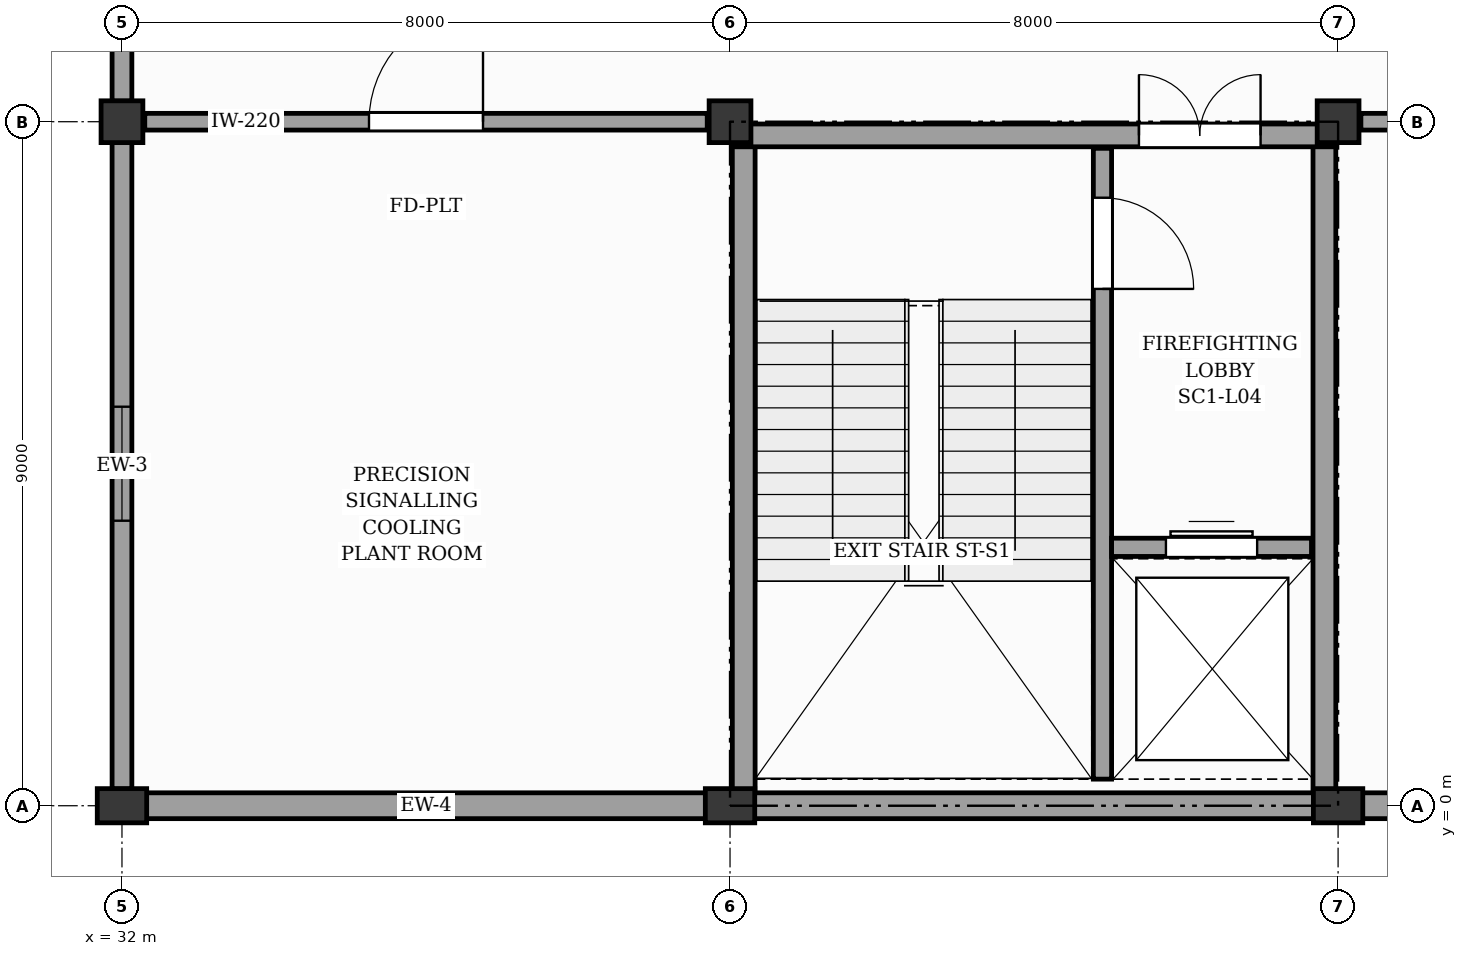
"""IFC4 building model, lengths in metres.
Left out: names, types, materials, properties, quantities, classifications, styles, units other than length and angle.
Written with IfcOpenShell. Run it as: python <this file> out.ifc"""

import sys

from ifc_helpers import new_model, si_unit, direction, frame, frame_2d, origin, origin_2d, place, context, subcontext, project, spatial, rectangle, extrude, element, fill, save


model = new_model("IFC4")
c1 = context("Model", 3, precision=1e-05, world=origin(), true_north=direction((0.0, 1.0)))
c2 = subcontext(c1, "Body", "Model", "MODEL_VIEW")
j1 = project(units=[si_unit("LENGTHUNIT", "METRE"), si_unit("PLANEANGLEUNIT", "RADIAN")], contexts=[c1])
p1 = place(None, origin())
s1 = spatial("IfcSite", under=j1, at=p1, CompositionType="ELEMENT")
p2 = place(p1, origin())
s2 = spatial("IfcBuilding", under=s1, at=p2, CompositionType="ELEMENT")
p3 = place(p2, frame((0.0, 0.0, 20.4)))
s3 = spatial("IfcBuildingStorey", under=s2, at=p3, CompositionType="ELEMENT", Elevation=20.4)
p4 = place(p3, frame((32.0, 0.0, 0.0), z_axis=(0.0, 0.0, 1.0), x_axis=(1.0, 0.0, 0.0)))
e1 = element("IfcColumn", 1, at=p4, inside=s3, PredefinedType="PILASTER", context=c2, shape_type="SweptSolid", body=[
    extrude(rectangle(XDim=0.65, YDim=0.45, at=origin_2d()), origin(), (0.0, 0.0, 1.0), 4.2),
])
p5 = place(p3, frame((32.0, 9.0, 0.0), z_axis=(0.0, 0.0, 1.0), x_axis=(1.0, 0.0, 0.0)))
e2 = element("IfcColumn", 2, at=p5, inside=s3, PredefinedType="COLUMN", context=c2, shape_type="SweptSolid", body=[
    extrude(rectangle(XDim=0.55, YDim=0.55, at=origin_2d()), origin(), (0.0, 0.0, 1.0), 4.2),
])
p6 = place(p3, frame((40.0, 0.0, 0.0), z_axis=(0.0, 0.0, 1.0), x_axis=(1.0, 0.0, 0.0)))
e3 = element("IfcColumn", 3, at=p6, inside=s3, PredefinedType="PILASTER", context=c2, shape_type="SweptSolid", body=[
    extrude(rectangle(XDim=0.65, YDim=0.45, at=origin_2d()), origin(), (0.0, 0.0, 1.0), 4.2),
])
p7 = place(p3, frame((40.0, 9.0, 0.0), z_axis=(0.0, 0.0, 1.0), x_axis=(1.0, 0.0, 0.0)))
e4 = element("IfcColumn", 4, at=p7, inside=s3, PredefinedType="COLUMN", context=c2, shape_type="SweptSolid", body=[
    extrude(rectangle(XDim=0.55, YDim=0.55, at=origin_2d()), origin(), (0.0, 0.0, 1.0), 4.2),
])
p8 = place(p3, frame((48.0, 0.0, 0.0), z_axis=(0.0, 0.0, 1.0), x_axis=(1.0, 0.0, 0.0)))
e5 = element("IfcColumn", 5, at=p8, inside=s3, PredefinedType="PILASTER", context=c2, shape_type="SweptSolid", body=[
    extrude(rectangle(XDim=0.65, YDim=0.45, at=origin_2d()), origin(), (0.0, 0.0, 1.0), 4.2),
])
p9 = place(p3, frame((48.0, 9.0, 0.0), z_axis=(0.0, 0.0, 1.0), x_axis=(1.0, 0.0, 0.0)))
e6 = element("IfcColumn", 6, at=p9, inside=s3, PredefinedType="COLUMN", context=c2, shape_type="SweptSolid", body=[
    extrude(rectangle(XDim=0.55, YDim=0.55, at=origin_2d()), origin(), (0.0, 0.0, 1.0), 4.2),
])
p10 = place(p3, frame((32.32, 0.0, 0.0), z_axis=(0.0, 0.0, 1.0), x_axis=(1.0, 0.0, 0.0)))
e7 = element("IfcWall", 7, at=p10, inside=s3, PredefinedType="SOLIDWALL", context=c2, shape_type="SweptSolid", body=[
    extrude(rectangle(XDim=7.36, YDim=0.34, at=frame_2d((3.68, 0.0))), origin(), (0.0, 0.0, 1.0), 3.24),
])
for number, where, z_axis, x_axis in (
    (8, (40.32, 0.0, 0.0), (0.0, 0.0, 1.0), (1.0, 0.0, 0.0)),
    (9, (48.32, 0.0, 0.0), (0.0, 0.0, 1.0), (1.0, 0.0, 0.0)),
):
    element("IfcWall", number, at=place(p3, frame(where, z_axis=z_axis, x_axis=x_axis)), inside=s3, PredefinedType="SOLIDWALL", context=c2, shape_type="SweptSolid", body=[
        extrude(rectangle(XDim=7.36, YDim=0.34, at=frame_2d((3.68, 0.0))), origin(), (0.0, 0.0, 1.0), 3.18),
    ])
p11 = place(p3, frame((32.0, 0.22, 0.0), z_axis=(0.0, 0.0, 1.0), x_axis=(0.0, 1.0, 0.0)))
e10 = element("IfcWall", 10, at=p11, inside=s3, PredefinedType="SOLIDWALL", context=c2, shape_type="SweptSolid", body=[
    extrude(rectangle(XDim=8.51, YDim=0.26, at=frame_2d((4.255, 0.0))), origin(), (0.0, 0.0, 1.0), 3.18),
])
p12 = place(p11, frame((3.53, 0.0, 0.95)))
e11 = element("IfcOpeningElement", 11, at=p12, cuts=e10, PredefinedType="OPENING", context=c2, shape_type="SweptSolid", body=[
    extrude(rectangle(XDim=1.5, YDim=1.9, at=frame_2d((0.75, 0.95))), frame((0.0, 0.14, 0.0), z_axis=(0.0, -1.0, 0.0), x_axis=(1.0, 0.0, 0.0)), (0.0, 0.0, 1.0), 0.28),
])
p13 = place(p3, frame((32.0, 9.27, 0.0), z_axis=(0.0, 0.0, 1.0), x_axis=(0.0, 1.0, 0.0)))
e12 = element("IfcWall", 12, at=p13, inside=s3, PredefinedType="SOLIDWALL", context=c2, shape_type="SweptSolid", body=[
    extrude(rectangle(XDim=8.46, YDim=0.26, at=frame_2d((4.23, 0.0))), origin(), (0.0, 0.0, 1.0), 3.18),
])
p14 = place(p13, frame((3.48, 0.0, 0.95)))
e13 = element("IfcOpeningElement", 13, at=p14, cuts=e12, PredefinedType="OPENING", context=c2, shape_type="SweptSolid", body=[
    extrude(rectangle(XDim=1.5, YDim=1.9, at=frame_2d((0.75, 0.95))), frame((0.0, 0.14, 0.0), z_axis=(0.0, -1.0, 0.0), x_axis=(1.0, 0.0, 0.0)), (0.0, 0.0, 1.0), 0.28),
])
p15 = place(p3, frame((44.9, 0.35, 0.0), z_axis=(0.0, 0.0, 1.0), x_axis=(0.0, 1.0, 0.0)))
e14 = element("IfcWall", 14, at=p15, inside=s3, PredefinedType="SHEAR", context=c2, shape_type="SweptSolid", body=[
    extrude(rectangle(XDim=8.3, YDim=0.24, at=frame_2d((4.15, 0.0))), origin(), (0.0, 0.0, 1.0), 3.92),
])
p16 = place(p15, frame((6.45, 0.0, 0.0)))
e15 = element("IfcOpeningElement", 15, at=p16, cuts=e14, PredefinedType="OPENING", context=c2, shape_type="SweptSolid", body=[
    extrude(rectangle(XDim=1.2, YDim=2.15, at=frame_2d((0.6, 1.075))), frame((0.0, 0.13, 0.0), z_axis=(0.0, -1.0, 0.0), x_axis=(1.0, 0.0, 0.0)), (0.0, 0.0, 1.0), 0.26),
])
p17 = place(p3, frame((45.02, 3.4, 0.0), z_axis=(0.0, 0.0, 1.0), x_axis=(1.0, 0.0, 0.0)))
e16 = element("IfcWall", 16, at=p17, inside=s3, PredefinedType="SHEAR", context=c2, shape_type="SweptSolid", body=[
    extrude(rectangle(XDim=2.63, YDim=0.24, at=frame_2d((1.315, 0.0))), origin(), (0.0, 0.0, 1.0), 3.92),
])
p18 = place(p17, frame((0.715, 0.0, 0.0)))
e17 = element("IfcOpeningElement", 17, at=p18, cuts=e16, PredefinedType="OPENING", context=c2, shape_type="SweptSolid", body=[
    extrude(rectangle(XDim=1.2, YDim=2.15, at=frame_2d((0.6, 1.075))), frame((0.0, 0.13, 0.0), z_axis=(0.0, -1.0, 0.0), x_axis=(1.0, 0.0, 0.0)), (0.0, 0.0, 1.0), 0.26),
])
for number, where, z_axis, x_axis in (
    (18, (40.18, 0.18, 0.0), (0.0, 0.0, 1.0), (0.0, 1.0, 0.0)),
    (19, (47.82, 0.18, 0.0), (0.0, 0.0, 1.0), (0.0, 1.0, 0.0)),
):
    element("IfcWall", number, at=place(p3, frame(where, z_axis=z_axis, x_axis=x_axis)), inside=s3, PredefinedType="SHEAR", context=c2, shape_type="SweptSolid", body=[
        extrude(rectangle(XDim=8.64, YDim=0.3, at=frame_2d((4.32, 0.0))), origin(), (0.0, 0.0, 1.0), 3.92),
    ])
p19 = place(p3, frame((40.03, 8.82, 0.0), z_axis=(0.0, 0.0, 1.0), x_axis=(1.0, 0.0, 0.0)))
e20 = element("IfcWall", 20, at=p19, inside=s3, PredefinedType="SHEAR", context=c2, shape_type="SweptSolid", body=[
    extrude(rectangle(XDim=7.94, YDim=0.3, at=frame_2d((3.97, 0.0))), origin(), (0.0, 0.0, 1.0), 3.92),
])
p20 = place(p19, frame((5.35, 0.0, 0.0)))
e21 = element("IfcOpeningElement", 21, at=p20, cuts=e20, PredefinedType="OPENING", context=c2, shape_type="SweptSolid", body=[
    extrude(rectangle(XDim=1.6, YDim=2.15, at=frame_2d((0.8, 1.075))), frame((0.0, 0.16, 0.0), z_axis=(0.0, -1.0, 0.0), x_axis=(1.0, 0.0, 0.0)), (0.0, 0.0, 1.0), 0.32),
])
p21 = place(p3, frame((32.3, 9.0, 0.0), z_axis=(0.0, 0.0, 1.0), x_axis=(1.0, 0.0, 0.0)))
e22 = element("IfcWall", 22, at=p21, inside=s3, PredefinedType="SOLIDWALL", context=c2, shape_type="SweptSolid", body=[
    extrude(rectangle(XDim=7.4, YDim=0.22, at=frame_2d((3.7, 0.0))), origin(), (0.0, 0.0, 1.0), 3.1),
])
p22 = place(p21, frame((2.95, 0.0, 0.0)))
e23 = element("IfcOpeningElement", 23, at=p22, cuts=e22, PredefinedType="OPENING", context=c2, shape_type="SweptSolid", body=[
    extrude(rectangle(XDim=1.5, YDim=2.2, at=frame_2d((0.75, 1.1))), frame((0.0, 0.12, 0.0), z_axis=(0.0, -1.0, 0.0), x_axis=(1.0, 0.0, 0.0)), (0.0, 0.0, 1.0), 0.24),
])
p23 = place(p3, frame((48.3, 9.0, 0.0), z_axis=(0.0, 0.0, 1.0), x_axis=(1.0, 0.0, 0.0)))
e24 = element("IfcWall", 24, at=p23, inside=s3, PredefinedType="SOLIDWALL", context=c2, shape_type="SweptSolid", body=[
    extrude(rectangle(XDim=7.4, YDim=0.22, at=frame_2d((3.7, 0.0))), origin(), (0.0, 0.0, 1.0), 3.1),
])
p24 = place(p23, frame((2.95, 0.0, 0.0)))
e25 = element("IfcOpeningElement", 25, at=p24, cuts=e24, PredefinedType="OPENING", context=c2, shape_type="SweptSolid", body=[
    extrude(rectangle(XDim=1.5, YDim=2.2, at=frame_2d((0.75, 1.1))), frame((0.0, 0.12, 0.0), z_axis=(0.0, -1.0, 0.0), x_axis=(1.0, 0.0, 0.0)), (0.0, 0.0, 1.0), 0.24),
])
p25 = place(p12, origin())
e26 = element("IfcWindow", 26, at=p25, inside=s3, PartitioningType="SINGLE_PANEL", PredefinedType="WINDOW", context=c2, shape_type="SweptSolid", body=[
    extrude(rectangle(XDim=1.5, YDim=1.9, at=frame_2d((0.75, 0.95))), frame((0.0, 0.03, 0.0), z_axis=(0.0, -1.0, 0.0), x_axis=(1.0, 0.0, 0.0)), (0.0, 0.0, 1.0), 0.06),
])
fill(e11, e26)
p26 = place(p16, frame((1.2, 0.0, 0.0), z_axis=(0.0, 0.0, 1.0), x_axis=(-1.0, 0.0, 0.0)))
e27 = element("IfcDoor", 27, at=p26, inside=s3, OperationType="SINGLE_SWING_LEFT", PredefinedType="DOOR", context=c2, shape_type="SweptSolid", body=[
    extrude(rectangle(XDim=1.2, YDim=2.15, at=frame_2d((0.6, 1.075))), frame((0.0, 0.025, 0.0), z_axis=(0.0, -1.0, 0.0), x_axis=(1.0, 0.0, 0.0)), (0.0, 0.0, 1.0), 0.05),
])
fill(e15, e27)
p27 = place(p18, origin())
e28 = element("IfcDoor", 28, at=p27, inside=s3, OperationType="DOUBLE_DOOR_SLIDING", PredefinedType="DOOR", context=c2, shape_type="SweptSolid", body=[
    extrude(rectangle(XDim=1.2, YDim=2.15, at=frame_2d((0.6, 1.075))), frame((0.0, 0.025, 0.0), z_axis=(0.0, -1.0, 0.0), x_axis=(1.0, 0.0, 0.0)), (0.0, 0.0, 1.0), 0.05),
])
fill(e17, e28)
p28 = place(p20, origin())
e29 = element("IfcDoor", 29, at=p28, inside=s3, OperationType="DOUBLE_DOOR_SINGLE_SWING", PredefinedType="DOOR", context=c2, shape_type="SweptSolid", body=[
    extrude(rectangle(XDim=1.6, YDim=2.15, at=frame_2d((0.8, 1.075))), frame((0.0, 0.025, 0.0), z_axis=(0.0, -1.0, 0.0), x_axis=(1.0, 0.0, 0.0)), (0.0, 0.0, 1.0), 0.05),
])
fill(e21, e29)
p29 = place(p22, origin())
e30 = element("IfcDoor", 30, at=p29, inside=s3, OperationType="SINGLE_SWING_RIGHT", PredefinedType="DOOR", context=c2, shape_type="SweptSolid", body=[
    extrude(rectangle(XDim=1.5, YDim=2.2, at=frame_2d((0.75, 1.1))), frame((0.0, 0.025, 0.0), z_axis=(0.0, -1.0, 0.0), x_axis=(1.0, 0.0, 0.0)), (0.0, 0.0, 1.0), 0.05),
])
fill(e23, e30)
save(model, sys.argv[1])
